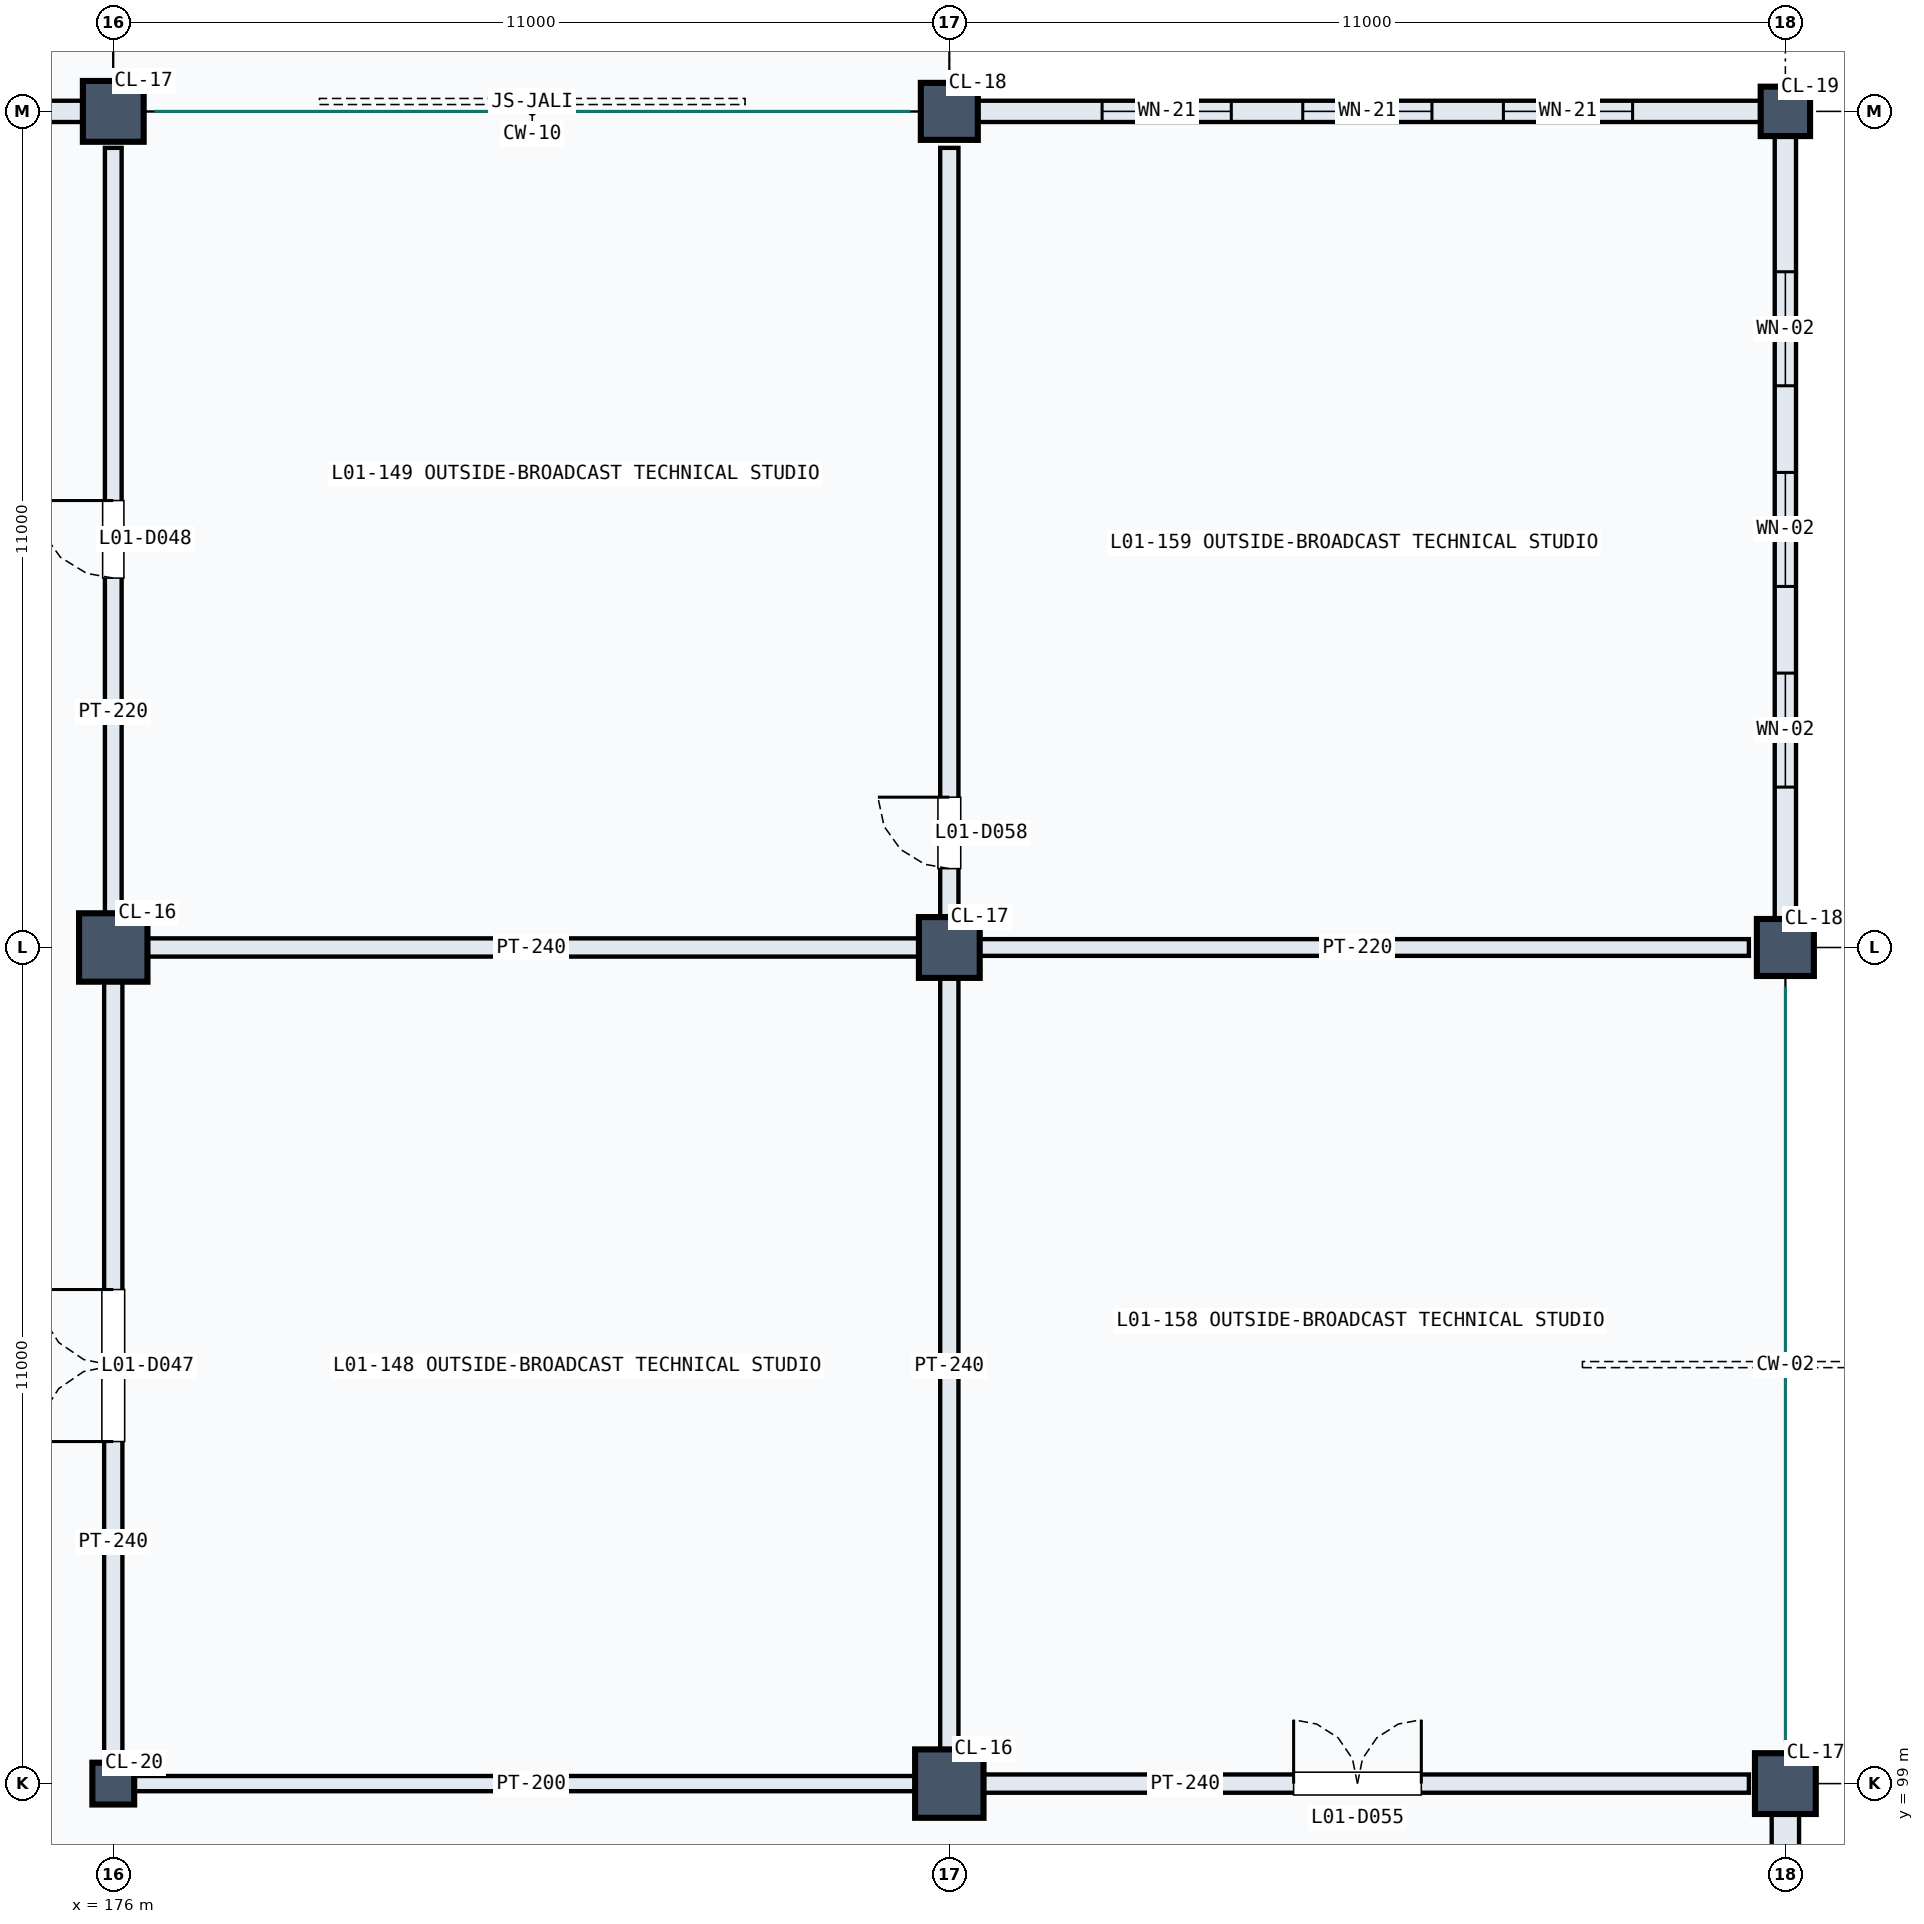
"""IFC4 building model, lengths in metres.
Left out: names, types, materials, properties, quantities, classifications, styles, units other than length and angle.
Written with IfcOpenShell. Run it as: python <this file> out.ifc"""

import sys

from ifc_helpers import new_model, si_unit, direction, frame, frame_2d, origin, origin_2d, place, context, subcontext, project, spatial, rectangle, circle, extrude, element, fill, save


model = new_model("IFC4")
c1 = context("Model", 3, precision=1e-05, world=origin(), true_north=direction((0.0, 1.0)))
c2 = subcontext(c1, "Body", "Model", "MODEL_VIEW")
j1 = project(units=[si_unit("LENGTHUNIT", "METRE"), si_unit("PLANEANGLEUNIT", "RADIAN")], contexts=[c1])
p1 = place(None, origin())
s1 = spatial("IfcSite", under=j1, at=p1, CompositionType="ELEMENT")
p2 = place(p1, origin())
s2 = spatial("IfcBuilding", under=s1, at=p2, CompositionType="ELEMENT")
p3 = place(p2, frame((0.0, 0.0, 5.4)))
s3 = spatial("IfcBuildingStorey", under=s2, at=p3, CompositionType="ELEMENT", Elevation=5.4)
p4 = place(p3, frame((176.0, 99.0, 0.0), z_axis=(0.0, 0.0, 1.0), x_axis=(1.0, 0.0, 0.0)))
e1 = element("IfcColumn", 1, at=p4, inside=s3, PredefinedType="COLUMN", context=c2, shape_type="SweptSolid", body=[
    extrude(circle(Radius=0.275, at=origin_2d()), origin(), (0.0, 0.0, 1.0), 4.8),
])
p5 = place(p3, frame((176.0, 110.0, 0.0), z_axis=(0.0, 0.0, 1.0), x_axis=(1.0, 0.0, 0.0)))
e2 = element("IfcColumn", 2, at=p5, inside=s3, PredefinedType="COLUMN", context=c2, shape_type="SweptSolid", body=[
    extrude(circle(Radius=0.45, at=origin_2d()), origin(), (0.0, 0.0, 1.0), 4.8),
])
p6 = place(p3, frame((176.0, 121.0, 0.0), z_axis=(0.0, 0.0, 1.0), x_axis=(1.0, 0.0, 0.0)))
e3 = element("IfcColumn", 3, at=p6, inside=s3, PredefinedType="COLUMN", context=c2, shape_type="SweptSolid", body=[
    extrude(circle(Radius=0.4, at=origin_2d()), origin(), (0.0, 0.0, 1.0), 4.8),
])
p7 = place(p3, frame((187.0, 99.0, 0.0), z_axis=(0.0, 0.0, 1.0), x_axis=(1.0, 0.0, 0.0)))
e4 = element("IfcColumn", 4, at=p7, inside=s3, PredefinedType="COLUMN", context=c2, shape_type="SweptSolid", body=[
    extrude(circle(Radius=0.45, at=origin_2d()), origin(), (0.0, 0.0, 1.0), 4.8),
])
p8 = place(p3, frame((187.0, 110.0, 0.0), z_axis=(0.0, 0.0, 1.0), x_axis=(1.0, 0.0, 0.0)))
e5 = element("IfcColumn", 5, at=p8, inside=s3, PredefinedType="COLUMN", context=c2, shape_type="SweptSolid", body=[
    extrude(circle(Radius=0.4, at=origin_2d()), origin(), (0.0, 0.0, 1.0), 4.8),
])
p9 = place(p3, frame((187.0, 121.0, 0.0), z_axis=(0.0, 0.0, 1.0), x_axis=(1.0, 0.0, 0.0)))
e6 = element("IfcColumn", 6, at=p9, inside=s3, PredefinedType="COLUMN", context=c2, shape_type="SweptSolid", body=[
    extrude(circle(Radius=0.375, at=origin_2d()), origin(), (0.0, 0.0, 1.0), 4.8),
])
p10 = place(p3, frame((198.0, 99.0, 0.0), z_axis=(0.0, 0.0, 1.0), x_axis=(1.0, 0.0, 0.0)))
e7 = element("IfcColumn", 7, at=p10, inside=s3, PredefinedType="COLUMN", context=c2, shape_type="SweptSolid", body=[
    extrude(circle(Radius=0.4, at=origin_2d()), origin(), (0.0, 0.0, 1.0), 4.8),
])
p11 = place(p3, frame((198.0, 110.0, 0.0), z_axis=(0.0, 0.0, 1.0), x_axis=(1.0, 0.0, 0.0)))
e8 = element("IfcColumn", 8, at=p11, inside=s3, PredefinedType="COLUMN", context=c2, shape_type="SweptSolid", body=[
    extrude(circle(Radius=0.375, at=origin_2d()), origin(), (0.0, 0.0, 1.0), 4.8),
])
p12 = place(p3, frame((198.0, 121.0, 0.0), z_axis=(0.0, 0.0, 1.0), x_axis=(1.0, 0.0, 0.0)))
e9 = element("IfcColumn", 9, at=p12, inside=s3, PredefinedType="COLUMN", context=c2, shape_type="SweptSolid", body=[
    extrude(circle(Radius=0.325, at=origin_2d()), origin(), (0.0, 0.0, 1.0), 4.8),
])
p13 = place(p3, frame((164.22, 121.0, 0.0), z_axis=(0.0, 0.0, 1.0), x_axis=(1.0, 0.0, 0.0)))
e10 = element("IfcWall", 10, at=p13, inside=s3, PredefinedType="SOLIDWALL", context=c2, shape_type="SweptSolid", body=[
    extrude(rectangle(XDim=11.56, YDim=0.28, at=frame_2d((5.78, 0.0))), origin(), (0.0, 0.0, 1.0), 3.705),
])
p14 = place(p13, frame((2.853, 0.0, 0.9)))
e11 = element("IfcOpeningElement", 11, at=p14, cuts=e10, PredefinedType="OPENING", context=c2, shape_type="SweptSolid", body=[
    extrude(rectangle(XDim=2.0, YDim=1.65, at=frame_2d((1.0, 0.825))), frame((0.0, 0.15, 0.0), z_axis=(0.0, -1.0, 0.0), x_axis=(1.0, 0.0, 0.0)), (0.0, 0.0, 1.0), 0.3),
])
p15 = place(p13, frame((6.707, 0.0, 0.9)))
e12 = element("IfcOpeningElement", 12, at=p15, cuts=e10, PredefinedType="OPENING", context=c2, shape_type="SweptSolid", body=[
    extrude(rectangle(XDim=2.0, YDim=1.65, at=frame_2d((1.0, 0.825))), frame((0.0, 0.15, 0.0), z_axis=(0.0, -1.0, 0.0), x_axis=(1.0, 0.0, 0.0)), (0.0, 0.0, 1.0), 0.3),
])
p16 = place(p3, frame((198.0, 88.22, 0.0), z_axis=(0.0, 0.0, 1.0), x_axis=(0.0, 1.0, 0.0)))
e13 = element("IfcWall", 13, at=p16, inside=s3, PredefinedType="SOLIDWALL", context=c2, shape_type="SweptSolid", body=[
    extrude(rectangle(XDim=10.56, YDim=0.36, at=frame_2d((5.28, 0.0))), origin(), (0.0, 0.0, 1.0), 3.705),
])
p17 = place(p16, frame((4.03, 0.0, 1.0)))
e14 = element("IfcOpeningElement", 14, at=p17, cuts=e13, PredefinedType="OPENING", context=c2, shape_type="SweptSolid", body=[
    extrude(rectangle(XDim=2.5, YDim=1.35, at=frame_2d((1.25, 0.675))), frame((0.0, 0.19, 0.0), z_axis=(0.0, -1.0, 0.0), x_axis=(1.0, 0.0, 0.0)), (0.0, 0.0, 1.0), 0.38),
])
p18 = place(p3, frame((187.22, 121.0, 0.0), z_axis=(0.0, 0.0, 1.0), x_axis=(1.0, 0.0, 0.0)))
e15 = element("IfcWall", 15, at=p18, inside=s3, PredefinedType="SOLIDWALL", context=c2, shape_type="SweptSolid", body=[
    extrude(rectangle(XDim=10.56, YDim=0.28, at=frame_2d((5.28, 0.0))), origin(), (0.0, 0.0, 1.0), 3.705),
])
p19 = place(p18, frame((1.79, 0.0, 1.0)))
e16 = element("IfcOpeningElement", 16, at=p19, cuts=e15, PredefinedType="OPENING", context=c2, shape_type="SweptSolid", body=[
    extrude(rectangle(XDim=1.7, YDim=1.3, at=frame_2d((0.85, 0.65))), frame((0.0, 0.15, 0.0), z_axis=(0.0, -1.0, 0.0), x_axis=(1.0, 0.0, 0.0)), (0.0, 0.0, 1.0), 0.3),
])
p20 = place(p18, frame((4.43, 0.0, 1.0)))
e17 = element("IfcOpeningElement", 17, at=p20, cuts=e15, PredefinedType="OPENING", context=c2, shape_type="SweptSolid", body=[
    extrude(rectangle(XDim=1.7, YDim=1.3, at=frame_2d((0.85, 0.65))), frame((0.0, 0.15, 0.0), z_axis=(0.0, -1.0, 0.0), x_axis=(1.0, 0.0, 0.0)), (0.0, 0.0, 1.0), 0.3),
])
p21 = place(p18, frame((7.07, 0.0, 1.0)))
e18 = element("IfcOpeningElement", 18, at=p21, cuts=e15, PredefinedType="OPENING", context=c2, shape_type="SweptSolid", body=[
    extrude(rectangle(XDim=1.7, YDim=1.3, at=frame_2d((0.85, 0.65))), frame((0.0, 0.15, 0.0), z_axis=(0.0, -1.0, 0.0), x_axis=(1.0, 0.0, 0.0)), (0.0, 0.0, 1.0), 0.3),
])
p22 = place(p3, frame((198.0, 110.22, 0.0), z_axis=(0.0, 0.0, 1.0), x_axis=(0.0, 1.0, 0.0)))
e19 = element("IfcWall", 19, at=p22, inside=s3, PredefinedType="SOLIDWALL", context=c2, shape_type="SweptSolid", body=[
    extrude(rectangle(XDim=10.56, YDim=0.28, at=frame_2d((5.28, 0.0))), origin(), (0.0, 0.0, 1.0), 3.705),
])
p23 = place(p22, frame((1.89, 0.0, 0.85)))
e20 = element("IfcOpeningElement", 20, at=p23, cuts=e19, PredefinedType="OPENING", context=c2, shape_type="SweptSolid", body=[
    extrude(rectangle(XDim=1.5, YDim=2.1, at=frame_2d((0.75, 1.05))), frame((0.0, 0.15, 0.0), z_axis=(0.0, -1.0, 0.0), x_axis=(1.0, 0.0, 0.0)), (0.0, 0.0, 1.0), 0.3),
])
p24 = place(p22, frame((4.53, 0.0, 0.85)))
e21 = element("IfcOpeningElement", 21, at=p24, cuts=e19, PredefinedType="OPENING", context=c2, shape_type="SweptSolid", body=[
    extrude(rectangle(XDim=1.5, YDim=2.1, at=frame_2d((0.75, 1.05))), frame((0.0, 0.15, 0.0), z_axis=(0.0, -1.0, 0.0), x_axis=(1.0, 0.0, 0.0)), (0.0, 0.0, 1.0), 0.3),
])
p25 = place(p22, frame((7.17, 0.0, 0.85)))
e22 = element("IfcOpeningElement", 22, at=p25, cuts=e19, PredefinedType="OPENING", context=c2, shape_type="SweptSolid", body=[
    extrude(rectangle(XDim=1.5, YDim=2.1, at=frame_2d((0.75, 1.05))), frame((0.0, 0.15, 0.0), z_axis=(0.0, -1.0, 0.0), x_axis=(1.0, 0.0, 0.0)), (0.0, 0.0, 1.0), 0.3),
])
p26 = place(p3, frame((176.0, 99.22, 0.0), z_axis=(0.0, 0.0, 1.0), x_axis=(0.0, 1.0, 0.0)))
e23 = element("IfcWall", 23, at=p26, inside=s3, PredefinedType="PARTITIONING", context=c2, shape_type="SweptSolid", body=[
    extrude(rectangle(XDim=10.56, YDim=0.24, at=frame_2d((5.28, 0.0))), origin(), (0.0, 0.0, 1.0), 3.705),
])
p27 = place(p26, frame((4.28, 0.0, 0.0)))
e24 = element("IfcOpeningElement", 24, at=p27, cuts=e23, PredefinedType="OPENING", context=c2, shape_type="SweptSolid", body=[
    extrude(rectangle(XDim=2.0, YDim=2.25, at=frame_2d((1.0, 1.125))), frame((0.0, 0.13, 0.0), z_axis=(0.0, -1.0, 0.0), x_axis=(1.0, 0.0, 0.0)), (0.0, 0.0, 1.0), 0.26),
])
p28 = place(p3, frame((176.0, 110.22, 0.0), z_axis=(0.0, 0.0, 1.0), x_axis=(0.0, 1.0, 0.0)))
e25 = element("IfcWall", 25, at=p28, inside=s3, PredefinedType="PARTITIONING", context=c2, shape_type="SweptSolid", body=[
    extrude(rectangle(XDim=10.3, YDim=0.22, at=frame_2d((5.15, 0.0))), origin(), (0.0, 0.0, 1.0), 3.705),
])
p29 = place(p28, frame((4.64, 0.0, 0.0)))
e26 = element("IfcOpeningElement", 26, at=p29, cuts=e25, PredefinedType="OPENING", context=c2, shape_type="SweptSolid", body=[
    extrude(rectangle(XDim=1.02, YDim=2.25, at=frame_2d((0.51, 1.125))), frame((0.0, 0.12, 0.0), z_axis=(0.0, -1.0, 0.0), x_axis=(1.0, 0.0, 0.0)), (0.0, 0.0, 1.0), 0.24),
])
p30 = place(p3, frame((176.22, 99.0, 0.0), z_axis=(0.0, 0.0, 1.0), x_axis=(1.0, 0.0, 0.0)))
e27 = element("IfcWall", 27, at=p30, inside=s3, PredefinedType="PARTITIONING", context=c2, shape_type="SweptSolid", body=[
    extrude(rectangle(XDim=10.56, YDim=0.2, at=frame_2d((5.28, 0.0))), origin(), (0.0, 0.0, 1.0), 3.705),
])
p31 = place(p3, frame((187.22, 99.0, 0.0), z_axis=(0.0, 0.0, 1.0), x_axis=(1.0, 0.0, 0.0)))
e28 = element("IfcWall", 28, at=p31, inside=s3, PredefinedType="PARTITIONING", context=c2, shape_type="SweptSolid", body=[
    extrude(rectangle(XDim=10.3, YDim=0.24, at=frame_2d((5.15, 0.0))), origin(), (0.0, 0.0, 1.0), 3.705),
])
p32 = place(p31, frame((4.31, 0.0, 0.0)))
e29 = element("IfcOpeningElement", 29, at=p32, cuts=e28, PredefinedType="OPENING", context=c2, shape_type="SweptSolid", body=[
    extrude(rectangle(XDim=1.68, YDim=2.2, at=frame_2d((0.84, 1.1))), frame((0.0, 0.13, 0.0), z_axis=(0.0, -1.0, 0.0), x_axis=(1.0, 0.0, 0.0)), (0.0, 0.0, 1.0), 0.26),
])
for number, where, z_axis, x_axis in (
    (30, (176.22, 110.0, 0.0), (0.0, 0.0, 1.0), (1.0, 0.0, 0.0)),
    (31, (187.0, 99.22, 0.0), (0.0, 0.0, 1.0), (0.0, 1.0, 0.0)),
):
    element("IfcWall", number, at=place(p3, frame(where, z_axis=z_axis, x_axis=x_axis)), inside=s3, PredefinedType="PARTITIONING", context=c2, shape_type="SweptSolid", body=[
        extrude(rectangle(XDim=10.56, YDim=0.24, at=frame_2d((5.28, 0.0))), origin(), (0.0, 0.0, 1.0), 3.705),
    ])
p33 = place(p3, frame((187.0, 110.22, 0.0), z_axis=(0.0, 0.0, 1.0), x_axis=(0.0, 1.0, 0.0)))
e32 = element("IfcWall", 32, at=p33, inside=s3, PredefinedType="PARTITIONING", context=c2, shape_type="SweptSolid", body=[
    extrude(rectangle(XDim=10.3, YDim=0.24, at=frame_2d((5.15, 0.0))), origin(), (0.0, 0.0, 1.0), 3.705),
])
p34 = place(p33, frame((0.817, 0.0, 0.0)))
e33 = element("IfcOpeningElement", 33, at=p34, cuts=e32, PredefinedType="OPENING", context=c2, shape_type="SweptSolid", body=[
    extrude(rectangle(XDim=0.94, YDim=2.15, at=frame_2d((0.47, 1.075))), frame((0.0, 0.13, 0.0), z_axis=(0.0, -1.0, 0.0), x_axis=(1.0, 0.0, 0.0)), (0.0, 0.0, 1.0), 0.26),
])
p35 = place(p3, frame((187.22, 110.0, 0.0), z_axis=(0.0, 0.0, 1.0), x_axis=(1.0, 0.0, 0.0)))
e34 = element("IfcWall", 34, at=p35, inside=s3, PredefinedType="PARTITIONING", context=c2, shape_type="SweptSolid", body=[
    extrude(rectangle(XDim=10.3, YDim=0.22, at=frame_2d((5.15, 0.0))), origin(), (0.0, 0.0, 1.0), 3.705),
])
p36 = place(p19, origin())
e35 = element("IfcWindow", 35, at=p36, inside=s3, PartitioningType="SINGLE_PANEL", PredefinedType="WINDOW", context=c2, shape_type="SweptSolid", body=[
    extrude(rectangle(XDim=1.7, YDim=1.3, at=frame_2d((0.85, 0.65))), frame((0.0, 0.03, 0.0), z_axis=(0.0, -1.0, 0.0), x_axis=(1.0, 0.0, 0.0)), (0.0, 0.0, 1.0), 0.06),
])
fill(e16, e35)
p37 = place(p20, origin())
e36 = element("IfcWindow", 36, at=p37, inside=s3, PartitioningType="SINGLE_PANEL", PredefinedType="WINDOW", context=c2, shape_type="SweptSolid", body=[
    extrude(rectangle(XDim=1.7, YDim=1.3, at=frame_2d((0.85, 0.65))), frame((0.0, 0.03, 0.0), z_axis=(0.0, -1.0, 0.0), x_axis=(1.0, 0.0, 0.0)), (0.0, 0.0, 1.0), 0.06),
])
fill(e17, e36)
p38 = place(p21, origin())
e37 = element("IfcWindow", 37, at=p38, inside=s3, PartitioningType="SINGLE_PANEL", PredefinedType="WINDOW", context=c2, shape_type="SweptSolid", body=[
    extrude(rectangle(XDim=1.7, YDim=1.3, at=frame_2d((0.85, 0.65))), frame((0.0, 0.03, 0.0), z_axis=(0.0, -1.0, 0.0), x_axis=(1.0, 0.0, 0.0)), (0.0, 0.0, 1.0), 0.06),
])
fill(e18, e37)
p39 = place(p23, origin())
e38 = element("IfcWindow", 38, at=p39, inside=s3, PartitioningType="SINGLE_PANEL", PredefinedType="WINDOW", context=c2, shape_type="SweptSolid", body=[
    extrude(rectangle(XDim=1.5, YDim=2.1, at=frame_2d((0.75, 1.05))), frame((0.0, 0.03, 0.0), z_axis=(0.0, -1.0, 0.0), x_axis=(1.0, 0.0, 0.0)), (0.0, 0.0, 1.0), 0.06),
])
fill(e20, e38)
p40 = place(p24, origin())
e39 = element("IfcWindow", 39, at=p40, inside=s3, PartitioningType="SINGLE_PANEL", PredefinedType="WINDOW", context=c2, shape_type="SweptSolid", body=[
    extrude(rectangle(XDim=1.5, YDim=2.1, at=frame_2d((0.75, 1.05))), frame((0.0, 0.03, 0.0), z_axis=(0.0, -1.0, 0.0), x_axis=(1.0, 0.0, 0.0)), (0.0, 0.0, 1.0), 0.06),
])
fill(e21, e39)
p41 = place(p25, origin())
e40 = element("IfcWindow", 40, at=p41, inside=s3, PartitioningType="SINGLE_PANEL", PredefinedType="WINDOW", context=c2, shape_type="SweptSolid", body=[
    extrude(rectangle(XDim=1.5, YDim=2.1, at=frame_2d((0.75, 1.05))), frame((0.0, 0.03, 0.0), z_axis=(0.0, -1.0, 0.0), x_axis=(1.0, 0.0, 0.0)), (0.0, 0.0, 1.0), 0.06),
])
fill(e22, e40)
p42 = place(p27, origin())
e41 = element("IfcDoor", 41, at=p42, inside=s3, OperationType="DOUBLE_DOOR_SINGLE_SWING", PredefinedType="DOOR", context=c2, shape_type="SweptSolid", body=[
    extrude(rectangle(XDim=2.0, YDim=2.25, at=frame_2d((1.0, 1.125))), frame((0.0, 0.025, 0.0), z_axis=(0.0, -1.0, 0.0), x_axis=(1.0, 0.0, 0.0)), (0.0, 0.0, 1.0), 0.05),
])
fill(e24, e41)
p43 = place(p29, origin())
e42 = element("IfcDoor", 42, at=p43, inside=s3, OperationType="SINGLE_SWING_RIGHT", PredefinedType="DOOR", context=c2, shape_type="SweptSolid", body=[
    extrude(rectangle(XDim=1.02, YDim=2.25, at=frame_2d((0.51, 1.125))), frame((0.0, 0.025, 0.0), z_axis=(0.0, -1.0, 0.0), x_axis=(1.0, 0.0, 0.0)), (0.0, 0.0, 1.0), 0.05),
])
fill(e26, e42)
p44 = place(p32, origin())
e43 = element("IfcDoor", 43, at=p44, inside=s3, OperationType="DOUBLE_DOOR_SINGLE_SWING", PredefinedType="DOOR", context=c2, shape_type="SweptSolid", body=[
    extrude(rectangle(XDim=1.68, YDim=2.2, at=frame_2d((0.84, 1.1))), frame((0.0, 0.025, 0.0), z_axis=(0.0, -1.0, 0.0), x_axis=(1.0, 0.0, 0.0)), (0.0, 0.0, 1.0), 0.05),
])
fill(e29, e43)
p45 = place(p34, origin())
e44 = element("IfcDoor", 44, at=p45, inside=s3, OperationType="SINGLE_SWING_RIGHT", PredefinedType="DOOR", context=c2, shape_type="SweptSolid", body=[
    extrude(rectangle(XDim=0.94, YDim=2.15, at=frame_2d((0.47, 1.075))), frame((0.0, 0.025, 0.0), z_axis=(0.0, -1.0, 0.0), x_axis=(1.0, 0.0, 0.0)), (0.0, 0.0, 1.0), 0.05),
])
fill(e33, e44)
save(model, sys.argv[1])
